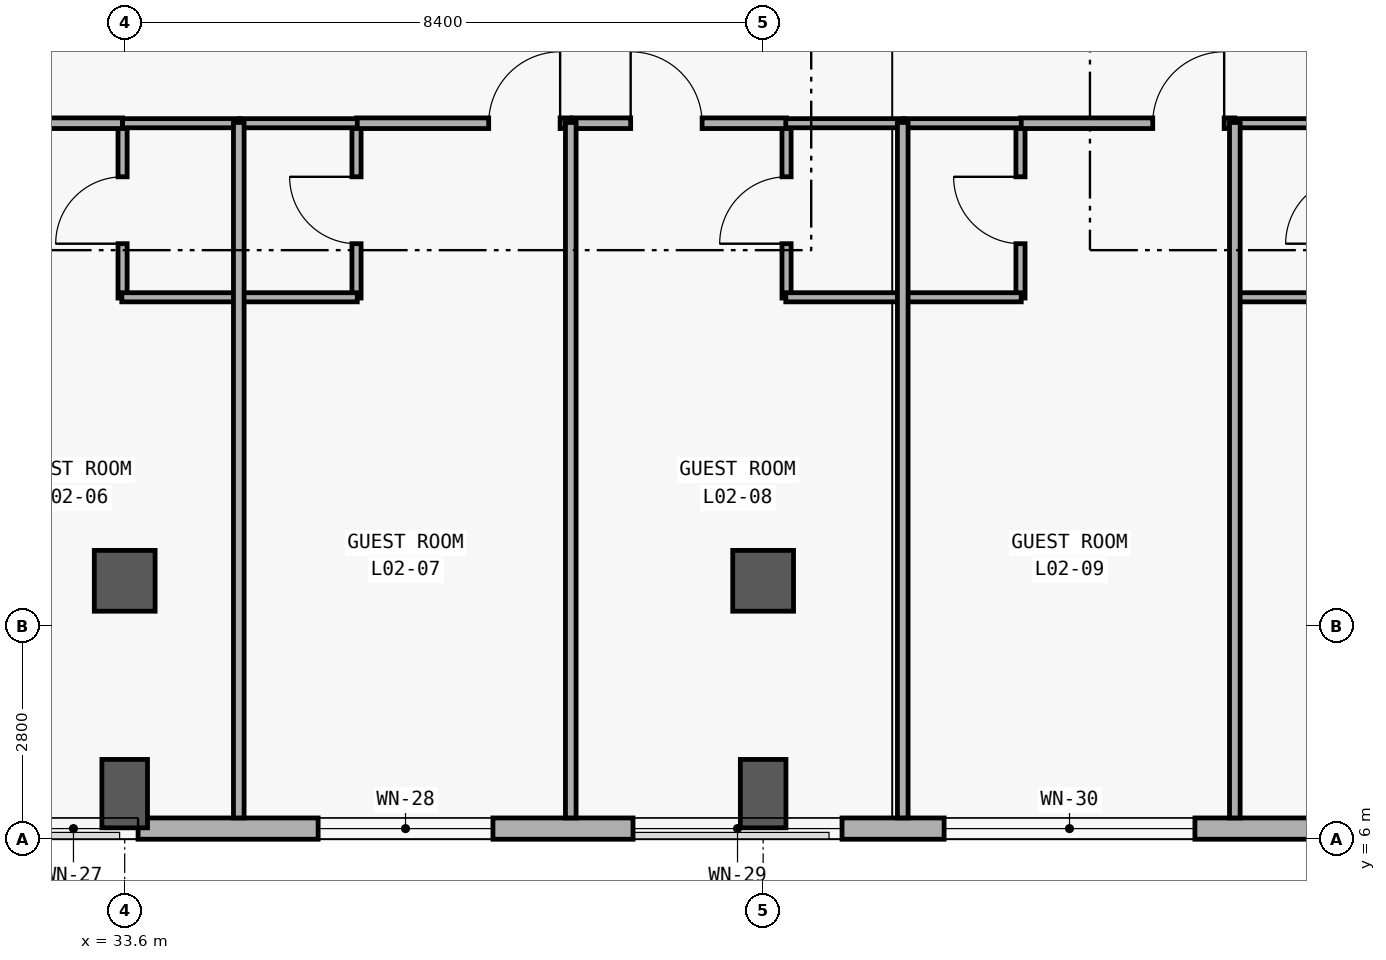
"""IFC4 building model, lengths in metres.
Left out: names, types, materials, properties, quantities, classifications, styles, units other than length and angle.
Written with IfcOpenShell. Run it as: python <this file> out.ifc"""

import sys

from ifc_helpers import new_model, si_unit, direction, frame, frame_2d, origin, origin_2d, place, context, subcontext, project, spatial, rectangle, extrude, element, fill, save


model = new_model("IFC4")
c1 = context("Model", 3, precision=1e-05, world=origin(), true_north=direction((0.0, 1.0)))
c2 = subcontext(c1, "Body", "Model", "MODEL_VIEW")
j1 = project(units=[si_unit("LENGTHUNIT", "METRE"), si_unit("PLANEANGLEUNIT", "RADIAN")], contexts=[c1])
p1 = place(None, origin())
s1 = spatial("IfcSite", under=j1, at=p1, CompositionType="ELEMENT")
p2 = place(p1, origin())
s2 = spatial("IfcBuilding", under=s1, at=p2, CompositionType="ELEMENT")
p3 = place(p2, frame((0.0, 0.0, 10.8)))
s3 = spatial("IfcBuildingStorey", under=s2, at=p3, CompositionType="ELEMENT", Elevation=10.8)
p4 = place(p3, frame((33.6, 6.6, 0.0), z_axis=(0.0, 0.0, 1.0), x_axis=(0.0, 1.0, 0.0)))
e1 = element("IfcColumn", 1, at=p4, inside=s3, PredefinedType="COLUMN", context=c2, shape_type="SweptSolid", body=[
    extrude(rectangle(XDim=0.6, YDim=0.9, at=origin_2d()), origin(), (0.0, 0.0, 1.0), 4.2),
])
p5 = place(p3, frame((33.6, 9.4, 0.0), z_axis=(0.0, 0.0, 1.0), x_axis=(1.0, 0.0, 0.0)))
e2 = element("IfcColumn", 2, at=p5, inside=s3, PredefinedType="COLUMN", context=c2, shape_type="SweptSolid", body=[
    extrude(rectangle(XDim=0.8, YDim=0.8, at=origin_2d()), origin(), (0.0, 0.0, 1.0), 4.2),
])
p6 = place(p3, frame((42.0, 6.6, 0.0), z_axis=(0.0, 0.0, 1.0), x_axis=(0.0, 1.0, 0.0)))
e3 = element("IfcColumn", 3, at=p6, inside=s3, PredefinedType="COLUMN", context=c2, shape_type="SweptSolid", body=[
    extrude(rectangle(XDim=0.6, YDim=0.9, at=origin_2d()), origin(), (0.0, 0.0, 1.0), 4.2),
])
p7 = place(p3, frame((42.0, 9.4, 0.0), z_axis=(0.0, 0.0, 1.0), x_axis=(1.0, 0.0, 0.0)))
e4 = element("IfcColumn", 4, at=p7, inside=s3, PredefinedType="COLUMN", context=c2, shape_type="SweptSolid", body=[
    extrude(rectangle(XDim=0.8, YDim=0.8, at=origin_2d()), origin(), (0.0, 0.0, 1.0), 4.2),
])
p8 = place(p3, frame((92.12, 6.14, 0.0), z_axis=(0.0, 0.0, 1.0), x_axis=(-1.0, 0.0, 0.0)))
e5 = element("IfcWall", 5, at=p8, inside=s3, PredefinedType="SOLIDWALL", context=c2, shape_type="SweptSolid", body=[
    extrude(rectangle(XDim=83.44, YDim=0.28, at=frame_2d((41.72, 0.0))), origin(), (0.0, 0.0, 1.0), 3.92),
])
p9 = place(p8, frame((79.486, 0.0, 0.85)))
e6 = element("IfcOpeningElement", 6, at=p9, cuts=e5, PredefinedType="OPENING", context=c2, shape_type="SweptSolid", body=[
    extrude(rectangle(XDim=3.1, YDim=2.2, at=frame_2d((1.55, 1.1))), frame((0.0, 0.15, 0.0), z_axis=(0.0, -1.0, 0.0), x_axis=(1.0, 0.0, 0.0)), (0.0, 0.0, 1.0), 0.3),
])
p10 = place(p8, frame((76.043, 0.0, 0.85)))
e7 = element("IfcOpeningElement", 7, at=p10, cuts=e5, PredefinedType="OPENING", context=c2, shape_type="SweptSolid", body=[
    extrude(rectangle(XDim=1.25, YDim=1.45, at=frame_2d((0.625, 0.725))), frame((0.0, 0.15, 0.0), z_axis=(0.0, -1.0, 0.0), x_axis=(1.0, 0.0, 0.0)), (0.0, 0.0, 1.0), 0.3),
])
p11 = place(p8, frame((71.624, 0.0, 0.85)))
e8 = element("IfcOpeningElement", 8, at=p11, cuts=e5, PredefinedType="OPENING", context=c2, shape_type="SweptSolid", body=[
    extrude(rectangle(XDim=1.35, YDim=1.55, at=frame_2d((0.675, 0.775))), frame((0.0, 0.15, 0.0), z_axis=(0.0, -1.0, 0.0), x_axis=(1.0, 0.0, 0.0)), (0.0, 0.0, 1.0), 0.3),
])
p12 = place(p8, frame((67.206, 0.0, 0.85)))
e9 = element("IfcOpeningElement", 9, at=p12, cuts=e5, PredefinedType="OPENING", context=c2, shape_type="SweptSolid", body=[
    extrude(rectangle(XDim=1.45, YDim=1.65, at=frame_2d((0.725, 0.825))), frame((0.0, 0.15, 0.0), z_axis=(0.0, -1.0, 0.0), x_axis=(1.0, 0.0, 0.0)), (0.0, 0.0, 1.0), 0.3),
])
p13 = place(p8, frame((62.787, 0.0, 0.85)))
e10 = element("IfcOpeningElement", 10, at=p13, cuts=e5, PredefinedType="OPENING", context=c2, shape_type="SweptSolid", body=[
    extrude(rectangle(XDim=1.55, YDim=1.65, at=frame_2d((0.775, 0.825))), frame((0.0, 0.15, 0.0), z_axis=(0.0, -1.0, 0.0), x_axis=(1.0, 0.0, 0.0)), (0.0, 0.0, 1.0), 0.3),
])
p14 = place(p8, frame((58.344, 0.0, 0.85)))
e11 = element("IfcOpeningElement", 11, at=p14, cuts=e5, PredefinedType="OPENING", context=c2, shape_type="SweptSolid", body=[
    extrude(rectangle(XDim=1.7, YDim=2.0, at=frame_2d((0.85, 1.0))), frame((0.0, 0.15, 0.0), z_axis=(0.0, -1.0, 0.0), x_axis=(1.0, 0.0, 0.0)), (0.0, 0.0, 1.0), 0.3),
])
p15 = place(p8, frame((53.675, 0.0, 0.85)))
e12 = element("IfcOpeningElement", 12, at=p15, cuts=e5, PredefinedType="OPENING", context=c2, shape_type="SweptSolid", body=[
    extrude(rectangle(XDim=2.3, YDim=2.05, at=frame_2d((1.15, 1.025))), frame((0.0, 0.15, 0.0), z_axis=(0.0, -1.0, 0.0), x_axis=(1.0, 0.0, 0.0)), (0.0, 0.0, 1.0), 0.3),
])
p16 = place(p8, frame((49.082, 0.0, 0.85)))
e13 = element("IfcOpeningElement", 13, at=p16, cuts=e5, PredefinedType="OPENING", context=c2, shape_type="SweptSolid", body=[
    extrude(rectangle(XDim=2.75, YDim=2.1, at=frame_2d((1.375, 1.05))), frame((0.0, 0.15, 0.0), z_axis=(0.0, -1.0, 0.0), x_axis=(1.0, 0.0, 0.0)), (0.0, 0.0, 1.0), 0.3),
])
p17 = place(p8, frame((44.439, 0.0, 0.85)))
e14 = element("IfcOpeningElement", 14, at=p17, cuts=e5, PredefinedType="OPENING", context=c2, shape_type="SweptSolid", body=[
    extrude(rectangle(XDim=3.3, YDim=2.15, at=frame_2d((1.65, 1.075))), frame((0.0, 0.15, 0.0), z_axis=(0.0, -1.0, 0.0), x_axis=(1.0, 0.0, 0.0)), (0.0, 0.0, 1.0), 0.3),
])
p18 = place(p8, frame((41.13, 0.0, 0.85)))
e15 = element("IfcOpeningElement", 15, at=p18, cuts=e5, PredefinedType="OPENING", context=c2, shape_type="SweptSolid", body=[
    extrude(rectangle(XDim=1.18, YDim=1.5, at=frame_2d((0.59, 0.75))), frame((0.0, 0.15, 0.0), z_axis=(0.0, -1.0, 0.0), x_axis=(1.0, 0.0, 0.0)), (0.0, 0.0, 1.0), 0.3),
])
p19 = place(p8, frame((36.712, 0.0, 0.85)))
e16 = element("IfcOpeningElement", 16, at=p19, cuts=e5, PredefinedType="OPENING", context=c2, shape_type="SweptSolid", body=[
    extrude(rectangle(XDim=1.28, YDim=1.6, at=frame_2d((0.64, 0.8))), frame((0.0, 0.15, 0.0), z_axis=(0.0, -1.0, 0.0), x_axis=(1.0, 0.0, 0.0)), (0.0, 0.0, 1.0), 0.3),
])
p20 = place(p8, frame((32.293, 0.0, 0.85)))
e17 = element("IfcOpeningElement", 17, at=p20, cuts=e5, PredefinedType="OPENING", context=c2, shape_type="SweptSolid", body=[
    extrude(rectangle(XDim=1.38, YDim=1.7, at=frame_2d((0.69, 0.85))), frame((0.0, 0.15, 0.0), z_axis=(0.0, -1.0, 0.0), x_axis=(1.0, 0.0, 0.0)), (0.0, 0.0, 1.0), 0.3),
])
p21 = place(p8, frame((27.875, 0.0, 0.85)))
e18 = element("IfcOpeningElement", 18, at=p21, cuts=e5, PredefinedType="OPENING", context=c2, shape_type="SweptSolid", body=[
    extrude(rectangle(XDim=1.48, YDim=1.8, at=frame_2d((0.74, 0.9))), frame((0.0, 0.15, 0.0), z_axis=(0.0, -1.0, 0.0), x_axis=(1.0, 0.0, 0.0)), (0.0, 0.0, 1.0), 0.3),
])
p22 = place(p8, frame((23.456, 0.0, 0.85)))
e19 = element("IfcOpeningElement", 19, at=p22, cuts=e5, PredefinedType="OPENING", context=c2, shape_type="SweptSolid", body=[
    extrude(rectangle(XDim=1.58, YDim=1.85, at=frame_2d((0.79, 0.925))), frame((0.0, 0.15, 0.0), z_axis=(0.0, -1.0, 0.0), x_axis=(1.0, 0.0, 0.0)), (0.0, 0.0, 1.0), 0.3),
])
p23 = place(p8, frame((19.038, 0.0, 0.85)))
e20 = element("IfcOpeningElement", 20, at=p23, cuts=e5, PredefinedType="OPENING", context=c2, shape_type="SweptSolid", body=[
    extrude(rectangle(XDim=1.68, YDim=1.9, at=frame_2d((0.84, 0.95))), frame((0.0, 0.15, 0.0), z_axis=(0.0, -1.0, 0.0), x_axis=(1.0, 0.0, 0.0)), (0.0, 0.0, 1.0), 0.3),
])
p24 = place(p8, frame((14.62, 0.0, 0.85)))
e21 = element("IfcOpeningElement", 21, at=p24, cuts=e5, PredefinedType="OPENING", context=c2, shape_type="SweptSolid", body=[
    extrude(rectangle(XDim=1.78, YDim=1.95, at=frame_2d((0.89, 0.975))), frame((0.0, 0.15, 0.0), z_axis=(0.0, -1.0, 0.0), x_axis=(1.0, 0.0, 0.0)), (0.0, 0.0, 1.0), 0.3),
])
p25 = place(p8, frame((10.201, 0.0, 0.85)))
e22 = element("IfcOpeningElement", 22, at=p25, cuts=e5, PredefinedType="OPENING", context=c2, shape_type="SweptSolid", body=[
    extrude(rectangle(XDim=1.88, YDim=1.95, at=frame_2d((0.94, 0.975))), frame((0.0, 0.15, 0.0), z_axis=(0.0, -1.0, 0.0), x_axis=(1.0, 0.0, 0.0)), (0.0, 0.0, 1.0), 0.3),
])
p26 = place(p8, frame((5.748, 0.0, 0.85)))
e23 = element("IfcOpeningElement", 23, at=p26, cuts=e5, PredefinedType="OPENING", context=c2, shape_type="SweptSolid", body=[
    extrude(rectangle(XDim=2.05, YDim=1.95, at=frame_2d((1.025, 0.975))), frame((0.0, 0.15, 0.0), z_axis=(0.0, -1.0, 0.0), x_axis=(1.0, 0.0, 0.0)), (0.0, 0.0, 1.0), 0.3),
])
p27 = place(p8, frame((1.314, 0.0, 0.85)))
e24 = element("IfcOpeningElement", 24, at=p27, cuts=e5, PredefinedType="OPENING", context=c2, shape_type="SweptSolid", body=[
    extrude(rectangle(XDim=2.18, YDim=1.95, at=frame_2d((1.09, 0.975))), frame((0.0, 0.15, 0.0), z_axis=(0.0, -1.0, 0.0), x_axis=(1.0, 0.0, 0.0)), (0.0, 0.0, 1.0), 0.3),
])
p28 = place(p3, frame((33.572, 13.12, 0.0), z_axis=(0.0, 0.0, 1.0), x_axis=(0.0, 1.0, 0.0)))
e25 = element("IfcWall", 25, at=p28, inside=s3, PredefinedType="PARTITIONING", context=c2, shape_type="SweptSolid", body=[
    extrude(rectangle(XDim=2.31, YDim=0.12, at=frame_2d((1.155, 0.0))), origin(), (0.0, 0.0, 1.0), 3.02),
])
p29 = place(p28, frame((0.715, 0.0, 0.0)))
e26 = element("IfcOpeningElement", 26, at=p29, cuts=e25, PredefinedType="OPENING", context=c2, shape_type="SweptSolid", body=[
    extrude(rectangle(XDim=0.88, YDim=2.15, at=frame_2d((0.44, 1.075))), frame((0.0, 0.07, 0.0), z_axis=(0.0, -1.0, 0.0), x_axis=(1.0, 0.0, 0.0)), (0.0, 0.0, 1.0), 0.14),
])
p30 = place(p3, frame((36.65, 13.12, 0.0), z_axis=(0.0, 0.0, 1.0), x_axis=(0.0, 1.0, 0.0)))
e27 = element("IfcWall", 27, at=p30, inside=s3, PredefinedType="PARTITIONING", context=c2, shape_type="SweptSolid", body=[
    extrude(rectangle(XDim=2.31, YDim=0.12, at=frame_2d((1.155, 0.0))), origin(), (0.0, 0.0, 1.0), 3.02),
])
p31 = place(p30, frame((0.715, 0.0, 0.0)))
e28 = element("IfcOpeningElement", 28, at=p31, cuts=e27, PredefinedType="OPENING", context=c2, shape_type="SweptSolid", body=[
    extrude(rectangle(XDim=0.88, YDim=2.15, at=frame_2d((0.44, 1.075))), frame((0.0, 0.07, 0.0), z_axis=(0.0, -1.0, 0.0), x_axis=(1.0, 0.0, 0.0)), (0.0, 0.0, 1.0), 0.14),
])
p32 = place(p3, frame((42.308, 13.12, 0.0), z_axis=(0.0, 0.0, 1.0), x_axis=(0.0, 1.0, 0.0)))
e29 = element("IfcWall", 29, at=p32, inside=s3, PredefinedType="PARTITIONING", context=c2, shape_type="SweptSolid", body=[
    extrude(rectangle(XDim=2.31, YDim=0.12, at=frame_2d((1.155, 0.0))), origin(), (0.0, 0.0, 1.0), 3.02),
])
p33 = place(p32, frame((0.715, 0.0, 0.0)))
e30 = element("IfcOpeningElement", 30, at=p33, cuts=e29, PredefinedType="OPENING", context=c2, shape_type="SweptSolid", body=[
    extrude(rectangle(XDim=0.88, YDim=2.15, at=frame_2d((0.44, 1.075))), frame((0.0, 0.07, 0.0), z_axis=(0.0, -1.0, 0.0), x_axis=(1.0, 0.0, 0.0)), (0.0, 0.0, 1.0), 0.14),
])
p34 = place(p3, frame((45.386, 13.12, 0.0), z_axis=(0.0, 0.0, 1.0), x_axis=(0.0, 1.0, 0.0)))
e31 = element("IfcWall", 31, at=p34, inside=s3, PredefinedType="PARTITIONING", context=c2, shape_type="SweptSolid", body=[
    extrude(rectangle(XDim=2.31, YDim=0.12, at=frame_2d((1.155, 0.0))), origin(), (0.0, 0.0, 1.0), 3.02),
])
p35 = place(p34, frame((0.715, 0.0, 0.0)))
e32 = element("IfcOpeningElement", 32, at=p35, cuts=e31, PredefinedType="OPENING", context=c2, shape_type="SweptSolid", body=[
    extrude(rectangle(XDim=0.88, YDim=2.15, at=frame_2d((0.44, 1.075))), frame((0.0, 0.07, 0.0), z_axis=(0.0, -1.0, 0.0), x_axis=(1.0, 0.0, 0.0)), (0.0, 0.0, 1.0), 0.14),
])
p36 = place(p3, frame((30.752, 15.42, 0.0), z_axis=(0.0, 0.0, 1.0), x_axis=(1.0, 0.0, 0.0)))
e33 = element("IfcWall", 33, at=p36, inside=s3, PredefinedType="PARTITIONING", context=c2, shape_type="SweptSolid", body=[
    extrude(rectangle(XDim=2.82, YDim=0.14, at=frame_2d((1.41, 0.0))), origin(), (0.0, 0.0, 1.0), 3.02),
])
p37 = place(p36, frame((0.654, 0.0, 0.0)))
e34 = element("IfcOpeningElement", 34, at=p37, cuts=e33, PredefinedType="OPENING", context=c2, shape_type="SweptSolid", body=[
    extrude(rectangle(XDim=0.94, YDim=2.2, at=frame_2d((0.47, 1.1))), frame((0.0, 0.08, 0.0), z_axis=(0.0, -1.0, 0.0), x_axis=(1.0, 0.0, 0.0)), (0.0, 0.0, 1.0), 0.16),
])
p38 = place(p3, frame((36.65, 15.42, 0.0), z_axis=(0.0, 0.0, 1.0), x_axis=(1.0, 0.0, 0.0)))
e35 = element("IfcWall", 35, at=p38, inside=s3, PredefinedType="PARTITIONING", context=c2, shape_type="SweptSolid", body=[
    extrude(rectangle(XDim=2.819, YDim=0.14, at=frame_2d((1.41, 0.0))), origin(), (0.0, 0.0, 1.0), 3.02),
])
p39 = place(p38, frame((1.739, 0.0, 0.0)))
e36 = element("IfcOpeningElement", 36, at=p39, cuts=e35, PredefinedType="OPENING", context=c2, shape_type="SweptSolid", body=[
    extrude(rectangle(XDim=0.94, YDim=2.2, at=frame_2d((0.47, 1.1))), frame((0.0, 0.08, 0.0), z_axis=(0.0, -1.0, 0.0), x_axis=(1.0, 0.0, 0.0)), (0.0, 0.0, 1.0), 0.16),
])
p40 = place(p3, frame((39.489, 15.42, 0.0), z_axis=(0.0, 0.0, 1.0), x_axis=(1.0, 0.0, 0.0)))
e37 = element("IfcWall", 37, at=p40, inside=s3, PredefinedType="PARTITIONING", context=c2, shape_type="SweptSolid", body=[
    extrude(rectangle(XDim=2.819, YDim=0.14, at=frame_2d((1.41, 0.0))), origin(), (0.0, 0.0, 1.0), 3.02),
])
p41 = place(p40, frame((0.768, 0.0, 0.0)))
e38 = element("IfcOpeningElement", 38, at=p41, cuts=e37, PredefinedType="OPENING", context=c2, shape_type="SweptSolid", body=[
    extrude(rectangle(XDim=0.94, YDim=2.2, at=frame_2d((0.47, 1.1))), frame((0.0, 0.08, 0.0), z_axis=(0.0, -1.0, 0.0), x_axis=(1.0, 0.0, 0.0)), (0.0, 0.0, 1.0), 0.16),
])
p42 = place(p3, frame((45.386, 15.42, 0.0), z_axis=(0.0, 0.0, 1.0), x_axis=(1.0, 0.0, 0.0)))
e39 = element("IfcWall", 39, at=p42, inside=s3, PredefinedType="PARTITIONING", context=c2, shape_type="SweptSolid", body=[
    extrude(rectangle(XDim=2.82, YDim=0.14, at=frame_2d((1.41, 0.0))), origin(), (0.0, 0.0, 1.0), 3.02),
])
p43 = place(p42, frame((1.74, 0.0, 0.0)))
e40 = element("IfcOpeningElement", 40, at=p43, cuts=e39, PredefinedType="OPENING", context=c2, shape_type="SweptSolid", body=[
    extrude(rectangle(XDim=0.94, YDim=2.2, at=frame_2d((0.47, 1.1))), frame((0.0, 0.08, 0.0), z_axis=(0.0, -1.0, 0.0), x_axis=(1.0, 0.0, 0.0)), (0.0, 0.0, 1.0), 0.16),
])
p44 = place(p3, frame((33.562, 13.13, 0.0), z_axis=(0.0, 0.0, 1.0), x_axis=(1.0, 0.0, 0.0)))
e41 = element("IfcWall", 41, at=p44, inside=s3, PredefinedType="PARTITIONING", context=c2, shape_type="SweptSolid", body=[
    extrude(rectangle(XDim=1.549, YDim=0.12, at=frame_2d((0.774, 0.0))), origin(), (0.0, 0.0, 1.0), 3.02),
])
p45 = place(p3, frame((33.572, 15.42, 0.0), z_axis=(0.0, 0.0, 1.0), x_axis=(1.0, 0.0, 0.0)))
e42 = element("IfcWall", 42, at=p45, inside=s3, PredefinedType="PARTITIONING", context=c2, shape_type="SweptSolid", body=[
    extrude(rectangle(XDim=1.539, YDim=0.12, at=frame_2d((0.77, 0.0))), origin(), (0.0, 0.0, 1.0), 3.02),
])
for number, where, z_axis, x_axis in (
    (43, (35.111, 13.13, 0.0), (0.0, 0.0, 1.0), (1.0, 0.0, 0.0)),
    (44, (35.111, 15.42, 0.0), (0.0, 0.0, 1.0), (1.0, 0.0, 0.0)),
    (45, (42.298, 13.13, 0.0), (0.0, 0.0, 1.0), (1.0, 0.0, 0.0)),
    (46, (42.298, 15.42, 0.0), (0.0, 0.0, 1.0), (1.0, 0.0, 0.0)),
):
    element("IfcWall", number, at=place(p3, frame(where, z_axis=z_axis, x_axis=x_axis)), inside=s3, PredefinedType="PARTITIONING", context=c2, shape_type="SweptSolid", body=[
        extrude(rectangle(XDim=1.549, YDim=0.12, at=frame_2d((0.774, 0.0))), origin(), (0.0, 0.0, 1.0), 3.02),
    ])
for number, where, z_axis, x_axis in (
    (47, (43.847, 13.13, 0.0), (0.0, 0.0, 1.0), (1.0, 0.0, 0.0)),
    (48, (43.847, 15.42, 0.0), (0.0, 0.0, 1.0), (1.0, 0.0, 0.0)),
):
    element("IfcWall", number, at=place(p3, frame(where, z_axis=z_axis, x_axis=x_axis)), inside=s3, PredefinedType="PARTITIONING", context=c2, shape_type="SweptSolid", body=[
        extrude(rectangle(XDim=1.549, YDim=0.12, at=frame_2d((0.774, 0.0))), origin(), (0.0, 0.0, 1.0), 3.02),
    ])
for number, where, z_axis, x_axis in (
    (49, (48.216, 13.13, 0.0), (0.0, 0.0, 1.0), (1.0, 0.0, 0.0)),
    (50, (48.216, 15.42, 0.0), (0.0, 0.0, 1.0), (1.0, 0.0, 0.0)),
):
    element("IfcWall", number, at=place(p3, frame(where, z_axis=z_axis, x_axis=x_axis)), inside=s3, PredefinedType="PARTITIONING", context=c2, shape_type="SweptSolid", body=[
        extrude(rectangle(XDim=1.549, YDim=0.12, at=frame_2d((0.774, 0.0))), origin(), (0.0, 0.0, 1.0), 3.02),
    ])
for number, where, z_axis, x_axis in (
    (51, (35.101, 6.28, 0.0), (0.0, 0.0, 1.0), (0.0, 1.0, 0.0)),
    (52, (39.469, 6.28, 0.0), (0.0, 0.0, 1.0), (0.0, 1.0, 0.0)),
    (53, (43.837, 6.28, 0.0), (0.0, 0.0, 1.0), (0.0, 1.0, 0.0)),
    (54, (48.206, 6.28, 0.0), (0.0, 0.0, 1.0), (0.0, 1.0, 0.0)),
):
    element("IfcWall", number, at=place(p3, frame(where, z_axis=z_axis, x_axis=x_axis)), inside=s3, PredefinedType="PARTITIONING", context=c2, shape_type="SweptSolid", body=[
        extrude(rectangle(XDim=9.15, YDim=0.14, at=frame_2d((4.575, 0.0))), origin(), (0.0, 0.0, 1.0), 3.02),
    ])
p46 = place(p14, origin())
e55 = element("IfcWindow", 55, at=p46, inside=s3, PartitioningType="SINGLE_PANEL", PredefinedType="WINDOW", context=c2, shape_type="SweptSolid", body=[
    extrude(rectangle(XDim=1.7, YDim=2.0, at=frame_2d((0.85, 1.0))), frame((0.0, 0.03, 0.0), z_axis=(0.0, -1.0, 0.0), x_axis=(1.0, 0.0, 0.0)), (0.0, 0.0, 1.0), 0.06),
])
fill(e11, e55)
p47 = place(p15, origin())
e56 = element("IfcWindow", 56, at=p47, inside=s3, PartitioningType="SINGLE_PANEL", PredefinedType="WINDOW", context=c2, shape_type="SweptSolid", body=[
    extrude(rectangle(XDim=2.3, YDim=2.05, at=frame_2d((1.15, 1.025))), frame((0.0, 0.03, 0.0), z_axis=(0.0, -1.0, 0.0), x_axis=(1.0, 0.0, 0.0)), (0.0, 0.0, 1.0), 0.06),
])
fill(e12, e56)
p48 = place(p16, origin())
e57 = element("IfcWindow", 57, at=p48, inside=s3, PartitioningType="SINGLE_PANEL", PredefinedType="WINDOW", context=c2, shape_type="SweptSolid", body=[
    extrude(rectangle(XDim=2.75, YDim=2.1, at=frame_2d((1.375, 1.05))), frame((0.0, 0.03, 0.0), z_axis=(0.0, -1.0, 0.0), x_axis=(1.0, 0.0, 0.0)), (0.0, 0.0, 1.0), 0.06),
])
fill(e13, e57)
p49 = place(p17, origin())
e58 = element("IfcWindow", 58, at=p49, inside=s3, PartitioningType="SINGLE_PANEL", PredefinedType="WINDOW", context=c2, shape_type="SweptSolid", body=[
    extrude(rectangle(XDim=3.3, YDim=2.15, at=frame_2d((1.65, 1.075))), frame((0.0, 0.03, 0.0), z_axis=(0.0, -1.0, 0.0), x_axis=(1.0, 0.0, 0.0)), (0.0, 0.0, 1.0), 0.06),
])
fill(e14, e58)
p50 = place(p29, origin())
e59 = element("IfcDoor", 59, at=p50, inside=s3, OperationType="SINGLE_SWING_LEFT", PredefinedType="DOOR", context=c2, shape_type="SweptSolid", body=[
    extrude(rectangle(XDim=0.88, YDim=2.15, at=frame_2d((0.44, 1.075))), frame((0.0, 0.025, 0.0), z_axis=(0.0, -1.0, 0.0), x_axis=(1.0, 0.0, 0.0)), (0.0, 0.0, 1.0), 0.05),
])
fill(e26, e59)
p51 = place(p31, origin())
e60 = element("IfcDoor", 60, at=p51, inside=s3, OperationType="SINGLE_SWING_RIGHT", PredefinedType="DOOR", context=c2, shape_type="SweptSolid", body=[
    extrude(rectangle(XDim=0.88, YDim=2.15, at=frame_2d((0.44, 1.075))), frame((0.0, 0.025, 0.0), z_axis=(0.0, -1.0, 0.0), x_axis=(1.0, 0.0, 0.0)), (0.0, 0.0, 1.0), 0.05),
])
fill(e28, e60)
p52 = place(p33, origin())
e61 = element("IfcDoor", 61, at=p52, inside=s3, OperationType="SINGLE_SWING_LEFT", PredefinedType="DOOR", context=c2, shape_type="SweptSolid", body=[
    extrude(rectangle(XDim=0.88, YDim=2.15, at=frame_2d((0.44, 1.075))), frame((0.0, 0.025, 0.0), z_axis=(0.0, -1.0, 0.0), x_axis=(1.0, 0.0, 0.0)), (0.0, 0.0, 1.0), 0.05),
])
fill(e30, e61)
p53 = place(p35, origin())
e62 = element("IfcDoor", 62, at=p53, inside=s3, OperationType="SINGLE_SWING_RIGHT", PredefinedType="DOOR", context=c2, shape_type="SweptSolid", body=[
    extrude(rectangle(XDim=0.88, YDim=2.15, at=frame_2d((0.44, 1.075))), frame((0.0, 0.025, 0.0), z_axis=(0.0, -1.0, 0.0), x_axis=(1.0, 0.0, 0.0)), (0.0, 0.0, 1.0), 0.05),
])
fill(e32, e62)
p54 = place(p39, origin())
e63 = element("IfcDoor", 63, at=p54, inside=s3, OperationType="SINGLE_SWING_RIGHT", PredefinedType="DOOR", context=c2, shape_type="SweptSolid", body=[
    extrude(rectangle(XDim=0.94, YDim=2.2, at=frame_2d((0.47, 1.1))), frame((0.0, 0.025, 0.0), z_axis=(0.0, -1.0, 0.0), x_axis=(1.0, 0.0, 0.0)), (0.0, 0.0, 1.0), 0.05),
])
fill(e36, e63)
p55 = place(p41, origin())
e64 = element("IfcDoor", 64, at=p55, inside=s3, OperationType="SINGLE_SWING_LEFT", PredefinedType="DOOR", context=c2, shape_type="SweptSolid", body=[
    extrude(rectangle(XDim=0.94, YDim=2.2, at=frame_2d((0.47, 1.1))), frame((0.0, 0.025, 0.0), z_axis=(0.0, -1.0, 0.0), x_axis=(1.0, 0.0, 0.0)), (0.0, 0.0, 1.0), 0.05),
])
fill(e38, e64)
p56 = place(p43, origin())
e65 = element("IfcDoor", 65, at=p56, inside=s3, OperationType="SINGLE_SWING_RIGHT", PredefinedType="DOOR", context=c2, shape_type="SweptSolid", body=[
    extrude(rectangle(XDim=0.94, YDim=2.2, at=frame_2d((0.47, 1.1))), frame((0.0, 0.025, 0.0), z_axis=(0.0, -1.0, 0.0), x_axis=(1.0, 0.0, 0.0)), (0.0, 0.0, 1.0), 0.05),
])
fill(e40, e65)
save(model, sys.argv[1])
